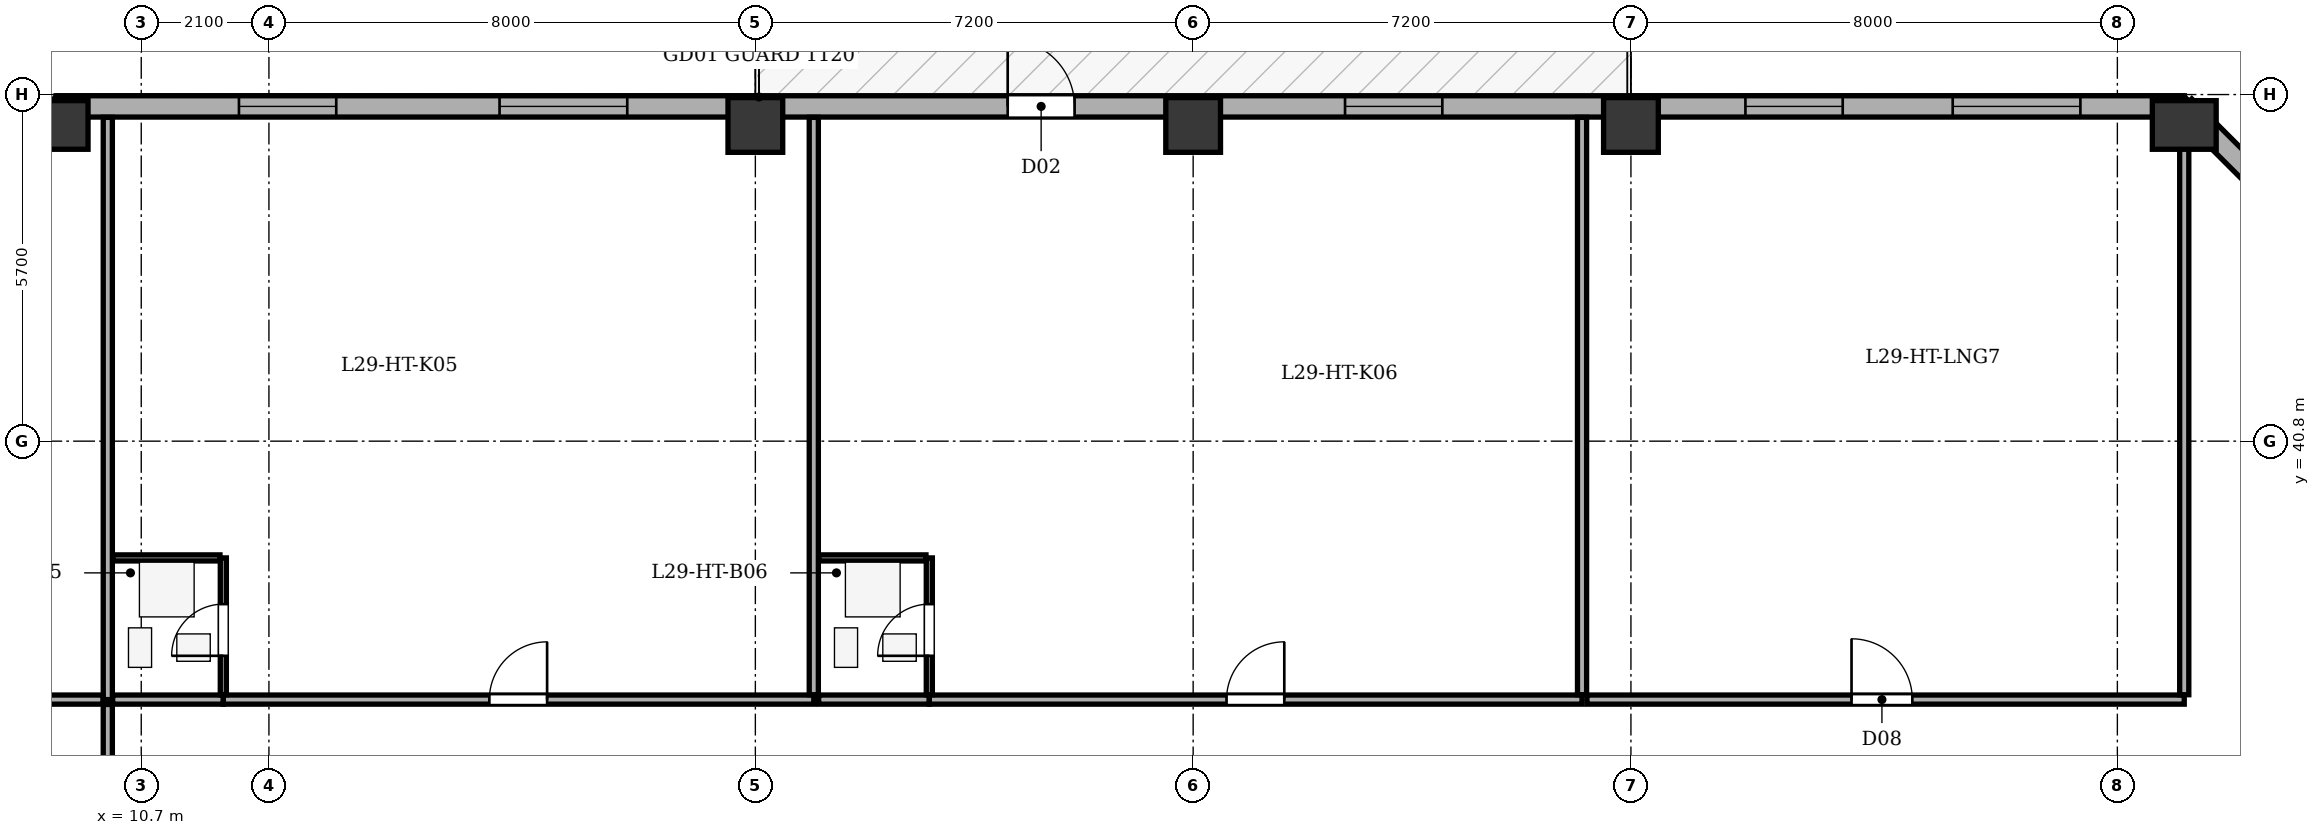
"""IFC4 building model, lengths in metres.
Left out: names, types, materials, properties, quantities, classifications, styles, units other than length and angle.
Written with IfcOpenShell. Run it as: python <this file> out.ifc"""

import sys

from ifc_helpers import new_model, si_unit, direction, frame, frame_2d, origin, origin_2d, place, context, subcontext, project, spatial, rectangle, extrude, element, fill, save


model = new_model("IFC4")
c1 = context("Model", 3, precision=1e-05, world=origin(), true_north=direction((0.0, 1.0)))
c2 = subcontext(c1, "Body", "Model", "MODEL_VIEW")
j1 = project(units=[si_unit("LENGTHUNIT", "METRE"), si_unit("PLANEANGLEUNIT", "RADIAN")], contexts=[c1])
p1 = place(None, origin())
s1 = spatial("IfcSite", under=j1, at=p1, CompositionType="ELEMENT")
p2 = place(p1, origin())
s2 = spatial("IfcBuilding", under=s1, at=p2, CompositionType="ELEMENT")
p3 = place(p2, frame((0.0, 0.0, 120.3)))
s3 = spatial("IfcBuildingStorey", under=s2, at=p3, CompositionType="ELEMENT", Elevation=120.3)
p4 = place(p3, frame((9.3, 46.0, 0.0), z_axis=(0.0, 0.0, 1.0), x_axis=(1.0, 0.0, 0.0)))
e1 = element("IfcColumn", 1, at=p4, inside=s3, PredefinedType="COLUMN", context=c2, shape_type="SweptSolid", body=[
    extrude(rectangle(XDim=0.8, YDim=1.05, at=origin_2d()), origin(), (0.0, 0.0, 1.0), 3.5),
])
for number, where, z_axis, x_axis in (
    (2, (20.8, 46.0, 0.0), (0.0, 0.0, 1.0), (1.0, 0.0, 0.0)),
    (3, (28.0, 46.0, 0.0), (0.0, 0.0, 1.0), (1.0, 0.0, 0.0)),
    (4, (35.2, 46.0, 0.0), (0.0, 0.0, 1.0), (1.0, 0.0, 0.0)),
):
    element("IfcColumn", number, at=place(p3, frame(where, z_axis=z_axis, x_axis=x_axis)), inside=s3, PredefinedType="COLUMN", context=c2, shape_type="SweptSolid", body=[
        extrude(rectangle(XDim=0.9, YDim=0.9, at=origin_2d()), origin(), (0.0, 0.0, 1.0), 3.5),
    ])
p5 = place(p3, frame((44.3, 46.0, 0.0), z_axis=(0.0, 0.0, 1.0), x_axis=(1.0, 0.0, 0.0)))
e5 = element("IfcColumn", 5, at=p5, inside=s3, PredefinedType="COLUMN", context=c2, shape_type="SweptSolid", body=[
    extrude(rectangle(XDim=0.8, YDim=1.05, at=origin_2d()), origin(), (0.0, 0.0, 1.0), 3.5),
])
p6 = place(p3, frame((4.495, 41.5, 0.0), z_axis=(0.0, 0.0, 1.0), x_axis=(0.707106781187, 0.707106781187, 0.0)))
e6 = element("IfcWall", 6, at=p6, inside=s3, PredefinedType="STANDARD", context=c2, shape_type="SweptSolid", body=[
    extrude(rectangle(XDim=6.795, YDim=0.35, at=frame_2d((3.397, 0.0))), origin(), (0.0, 0.0, 1.0), 2.785),
])
p7 = place(p6, frame((2.698, 0.0, 0.75)))
e7 = element("IfcOpeningElement", 7, at=p7, cuts=e6, PredefinedType="OPENING", context=c2, shape_type="SweptSolid", body=[
    extrude(rectangle(XDim=1.4, YDim=1.65, at=frame_2d((0.7, 0.825))), frame((0.0, 0.185, 0.0), z_axis=(0.0, -1.0, 0.0), x_axis=(1.0, 0.0, 0.0)), (0.0, 0.0, 1.0), 0.37),
])
p8 = place(p3, frame((9.3, 46.305, 0.0), z_axis=(0.0, 0.0, 1.0), x_axis=(1.0, 0.0, 0.0)))
e8 = element("IfcWall", 8, at=p8, inside=s3, PredefinedType="STANDARD", context=c2, shape_type="SweptSolid", body=[
    extrude(rectangle(XDim=35.0, YDim=0.35, at=frame_2d((17.5, 0.0))), origin(), (0.0, 0.0, 1.0), 2.785),
])
p9 = place(p8, frame((15.65, 0.0, 0.0)))
e9 = element("IfcOpeningElement", 9, at=p9, cuts=e8, PredefinedType="OPENING", context=c2, shape_type="SweptSolid", body=[
    extrude(rectangle(XDim=1.1, YDim=2.05, at=frame_2d((0.55, 1.025))), frame((0.0, 0.185, 0.0), z_axis=(0.0, -1.0, 0.0), x_axis=(1.0, 0.0, 0.0)), (0.0, 0.0, 1.0), 0.37),
])
p10 = place(p8, frame((3.007, 0.0, 0.75)))
e10 = element("IfcOpeningElement", 10, at=p10, cuts=e8, PredefinedType="OPENING", context=c2, shape_type="SweptSolid", body=[
    extrude(rectangle(XDim=1.6, YDim=1.75, at=frame_2d((0.8, 0.875))), frame((0.0, 0.185, 0.0), z_axis=(0.0, -1.0, 0.0), x_axis=(1.0, 0.0, 0.0)), (0.0, 0.0, 1.0), 0.37),
])
p11 = place(p8, frame((7.293, 0.0, 0.75)))
e11 = element("IfcOpeningElement", 11, at=p11, cuts=e8, PredefinedType="OPENING", context=c2, shape_type="SweptSolid", body=[
    extrude(rectangle(XDim=2.1, YDim=1.75, at=frame_2d((1.05, 0.875))), frame((0.0, 0.185, 0.0), z_axis=(0.0, -1.0, 0.0), x_axis=(1.0, 0.0, 0.0)), (0.0, 0.0, 1.0), 0.37),
])
p12 = place(p8, frame((21.198, 0.0, 0.75)))
e12 = element("IfcOpeningElement", 12, at=p12, cuts=e8, PredefinedType="OPENING", context=c2, shape_type="SweptSolid", body=[
    extrude(rectangle(XDim=1.6, YDim=1.75, at=frame_2d((0.8, 0.875))), frame((0.0, 0.185, 0.0), z_axis=(0.0, -1.0, 0.0), x_axis=(1.0, 0.0, 0.0)), (0.0, 0.0, 1.0), 0.37),
])
p13 = place(p8, frame((27.783, 0.0, 0.75)))
e13 = element("IfcOpeningElement", 13, at=p13, cuts=e8, PredefinedType="OPENING", context=c2, shape_type="SweptSolid", body=[
    extrude(rectangle(XDim=1.6, YDim=1.75, at=frame_2d((0.8, 0.875))), frame((0.0, 0.185, 0.0), z_axis=(0.0, -1.0, 0.0), x_axis=(1.0, 0.0, 0.0)), (0.0, 0.0, 1.0), 0.37),
])
p14 = place(p8, frame((31.192, 0.0, 0.75)))
e14 = element("IfcOpeningElement", 14, at=p14, cuts=e8, PredefinedType="OPENING", context=c2, shape_type="SweptSolid", body=[
    extrude(rectangle(XDim=2.1, YDim=1.75, at=frame_2d((1.05, 0.875))), frame((0.0, 0.185, 0.0), z_axis=(0.0, -1.0, 0.0), x_axis=(1.0, 0.0, 0.0)), (0.0, 0.0, 1.0), 0.37),
])
p15 = place(p3, frame((44.3, 46.305, 0.0), z_axis=(0.0, 0.0, 1.0), x_axis=(0.707106781187, -0.707106781187, 0.0)))
e15 = element("IfcWall", 15, at=p15, inside=s3, PredefinedType="STANDARD", context=c2, shape_type="SweptSolid", body=[
    extrude(rectangle(XDim=6.795, YDim=0.35, at=frame_2d((3.397, 0.0))), origin(), (0.0, 0.0, 1.0), 2.785),
])
p16 = place(p15, frame((2.698, 0.0, 0.75)))
e16 = element("IfcOpeningElement", 16, at=p16, cuts=e15, PredefinedType="OPENING", context=c2, shape_type="SweptSolid", body=[
    extrude(rectangle(XDim=1.4, YDim=1.65, at=frame_2d((0.7, 0.825))), frame((0.0, 0.185, 0.0), z_axis=(0.0, -1.0, 0.0), x_axis=(1.0, 0.0, 0.0)), (0.0, 0.0, 1.0), 0.37),
])
p17 = place(p3, frame((10.15, 36.55, 0.0), z_axis=(0.0, 0.0, 1.0), x_axis=(0.0, 1.0, 0.0)))
e17 = element("IfcWall", 17, at=p17, inside=s3, PredefinedType="PARTITIONING", context=c2, shape_type="SweptSolid", body=[
    extrude(rectangle(XDim=9.575, YDim=0.15, at=frame_2d((4.788, 0.0))), origin(), (0.0, 0.0, 1.0), 3.2),
])
p18 = place(p3, frame((10.23, 36.55, 0.0), z_axis=(0.0, 0.0, 1.0), x_axis=(1.0, 0.0, 0.0)))
e18 = element("IfcWall", 18, at=p18, inside=s3, PredefinedType="PARTITIONING", context=c2, shape_type="SweptSolid", body=[
    extrude(rectangle(XDim=1.82, YDim=0.15, at=frame_2d((0.91, 0.0))), origin(), (0.0, 0.0, 1.0), 3.2),
])
p19 = place(p3, frame((12.05, 36.55, 0.0), z_axis=(0.0, 0.0, 1.0), x_axis=(1.0, 0.0, 0.0)))
e19 = element("IfcWall", 19, at=p19, inside=s3, PredefinedType="PARTITIONING", context=c2, shape_type="SweptSolid", body=[
    extrude(rectangle(XDim=9.711, YDim=0.15, at=frame_2d((4.855, 0.0))), origin(), (0.0, 0.0, 1.0), 3.2),
])
p20 = place(p19, frame((4.375, 0.0, 0.0)))
e20 = element("IfcOpeningElement", 20, at=p20, cuts=e19, PredefinedType="OPENING", context=c2, shape_type="SweptSolid", body=[
    extrude(rectangle(XDim=0.95, YDim=2.1, at=frame_2d((0.475, 1.05))), frame((0.0, 0.085, 0.0), z_axis=(0.0, -1.0, 0.0), x_axis=(1.0, 0.0, 0.0)), (0.0, 0.0, 1.0), 0.17),
])
p21 = place(p3, frame((12.05, 36.63, 0.0), z_axis=(0.0, 0.0, 1.0), x_axis=(0.0, 1.0, 0.0)))
e21 = element("IfcWall", 21, at=p21, inside=s3, PredefinedType="PARTITIONING", context=c2, shape_type="SweptSolid", body=[
    extrude(rectangle(XDim=2.25, YDim=0.1, at=frame_2d((1.125, 0.0))), origin(), (0.0, 0.0, 1.0), 3.2),
])
p22 = place(p21, frame((0.64, 0.0, 0.0)))
e22 = element("IfcOpeningElement", 22, at=p22, cuts=e21, PredefinedType="OPENING", context=c2, shape_type="SweptSolid", body=[
    extrude(rectangle(XDim=0.85, YDim=2.05, at=frame_2d((0.425, 1.025))), frame((0.0, 0.06, 0.0), z_axis=(0.0, -1.0, 0.0), x_axis=(1.0, 0.0, 0.0)), (0.0, 0.0, 1.0), 0.12),
])
p23 = place(p3, frame((10.23, 38.88, 0.0), z_axis=(0.0, 0.0, 1.0), x_axis=(1.0, 0.0, 0.0)))
e23 = element("IfcWall", 23, at=p23, inside=s3, PredefinedType="PARTITIONING", context=c2, shape_type="SweptSolid", body=[
    extrude(rectangle(XDim=1.765, YDim=0.1, at=frame_2d((0.883, 0.0))), origin(), (0.0, 0.0, 1.0), 3.2),
])
p24 = place(p3, frame((21.761, 36.63, 0.0), z_axis=(0.0, 0.0, 1.0), x_axis=(0.0, 1.0, 0.0)))
e24 = element("IfcWall", 24, at=p24, inside=s3, PredefinedType="PARTITIONING", context=c2, shape_type="SweptSolid", body=[
    extrude(rectangle(XDim=9.495, YDim=0.15, at=frame_2d((4.748, 0.0))), origin(), (0.0, 0.0, 1.0), 3.2),
])
p25 = place(p3, frame((21.841, 36.55, 0.0), z_axis=(0.0, 0.0, 1.0), x_axis=(1.0, 0.0, 0.0)))
e25 = element("IfcWall", 25, at=p25, inside=s3, PredefinedType="PARTITIONING", context=c2, shape_type="SweptSolid", body=[
    extrude(rectangle(XDim=1.82, YDim=0.15, at=frame_2d((0.91, 0.0))), origin(), (0.0, 0.0, 1.0), 3.2),
])
p26 = place(p3, frame((23.661, 36.55, 0.0), z_axis=(0.0, 0.0, 1.0), x_axis=(1.0, 0.0, 0.0)))
e26 = element("IfcWall", 26, at=p26, inside=s3, PredefinedType="PARTITIONING", context=c2, shape_type="SweptSolid", body=[
    extrude(rectangle(XDim=10.735, YDim=0.15, at=frame_2d((5.368, 0.0))), origin(), (0.0, 0.0, 1.0), 3.2),
])
p27 = place(p26, frame((4.888, 0.0, 0.0)))
e27 = element("IfcOpeningElement", 27, at=p27, cuts=e26, PredefinedType="OPENING", context=c2, shape_type="SweptSolid", body=[
    extrude(rectangle(XDim=0.95, YDim=2.1, at=frame_2d((0.475, 1.05))), frame((0.0, 0.085, 0.0), z_axis=(0.0, -1.0, 0.0), x_axis=(1.0, 0.0, 0.0)), (0.0, 0.0, 1.0), 0.17),
])
p28 = place(p3, frame((23.661, 36.63, 0.0), z_axis=(0.0, 0.0, 1.0), x_axis=(0.0, 1.0, 0.0)))
e28 = element("IfcWall", 28, at=p28, inside=s3, PredefinedType="PARTITIONING", context=c2, shape_type="SweptSolid", body=[
    extrude(rectangle(XDim=2.25, YDim=0.1, at=frame_2d((1.125, 0.0))), origin(), (0.0, 0.0, 1.0), 3.2),
])
p29 = place(p28, frame((0.64, 0.0, 0.0)))
e29 = element("IfcOpeningElement", 29, at=p29, cuts=e28, PredefinedType="OPENING", context=c2, shape_type="SweptSolid", body=[
    extrude(rectangle(XDim=0.85, YDim=2.05, at=frame_2d((0.425, 1.025))), frame((0.0, 0.06, 0.0), z_axis=(0.0, -1.0, 0.0), x_axis=(1.0, 0.0, 0.0)), (0.0, 0.0, 1.0), 0.12),
])
p30 = place(p3, frame((21.841, 38.88, 0.0), z_axis=(0.0, 0.0, 1.0), x_axis=(1.0, 0.0, 0.0)))
e30 = element("IfcWall", 30, at=p30, inside=s3, PredefinedType="PARTITIONING", context=c2, shape_type="SweptSolid", body=[
    extrude(rectangle(XDim=1.765, YDim=0.1, at=frame_2d((0.882, 0.0))), origin(), (0.0, 0.0, 1.0), 3.2),
])
p31 = place(p3, frame((34.396, 36.63, 0.0), z_axis=(0.0, 0.0, 1.0), x_axis=(0.0, 1.0, 0.0)))
e31 = element("IfcWall", 31, at=p31, inside=s3, PredefinedType="PARTITIONING", context=c2, shape_type="SweptSolid", body=[
    extrude(rectangle(XDim=9.495, YDim=0.15, at=frame_2d((4.748, 0.0))), origin(), (0.0, 0.0, 1.0), 3.2),
])
p32 = place(p3, frame((34.476, 36.55, 0.0), z_axis=(0.0, 0.0, 1.0), x_axis=(1.0, 0.0, 0.0)))
e32 = element("IfcWall", 32, at=p32, inside=s3, PredefinedType="PARTITIONING", context=c2, shape_type="SweptSolid", body=[
    extrude(rectangle(XDim=9.824, YDim=0.15, at=frame_2d((4.912, 0.0))), origin(), (0.0, 0.0, 1.0), 3.2),
])
p33 = place(p32, frame((4.352, 0.0, 0.0)))
e33 = element("IfcOpeningElement", 33, at=p33, cuts=e32, PredefinedType="OPENING", context=c2, shape_type="SweptSolid", body=[
    extrude(rectangle(XDim=1.0, YDim=2.1, at=frame_2d((0.5, 1.05))), frame((0.0, 0.085, 0.0), z_axis=(0.0, -1.0, 0.0), x_axis=(1.0, 0.0, 0.0)), (0.0, 0.0, 1.0), 0.17),
])
p34 = place(p3, frame((44.3, 36.63, 0.0), z_axis=(0.0, 0.0, 1.0), x_axis=(0.0, 1.0, 0.0)))
e34 = element("IfcWall", 34, at=p34, inside=s3, PredefinedType="PARTITIONING", context=c2, shape_type="SweptSolid", body=[
    extrude(rectangle(XDim=9.495, YDim=0.15, at=frame_2d((4.748, 0.0))), origin(), (0.0, 0.0, 1.0), 3.2),
])
p35 = place(p3, frame((4.675, 36.55, 0.0), z_axis=(0.0, 0.0, 1.0), x_axis=(1.0, 0.0, 0.0)))
e35 = element("IfcWall", 35, at=p35, inside=s3, PredefinedType="PARTITIONING", context=c2, shape_type="SweptSolid", body=[
    extrude(rectangle(XDim=5.395, YDim=0.15, at=frame_2d((2.698, 0.0))), origin(), (0.0, 0.0, 1.0), 3.2),
])
p36 = place(p3, frame((10.15, 17.93, 0.0), z_axis=(0.0, 0.0, 1.0), x_axis=(0.0, 1.0, 0.0)))
e36 = element("IfcWall", 36, at=p36, inside=s3, PredefinedType="PARTITIONING", context=c2, shape_type="SweptSolid", body=[
    extrude(rectangle(XDim=18.54, YDim=0.15, at=frame_2d((9.27, 0.0))), origin(), (0.0, 0.0, 1.0), 3.2),
])
p37 = place(p36, frame((8.79, 0.0, 0.0)))
e37 = element("IfcOpeningElement", 37, at=p37, cuts=e36, PredefinedType="OPENING", context=c2, shape_type="SweptSolid", body=[
    extrude(rectangle(XDim=0.95, YDim=2.1, at=frame_2d((0.475, 1.05))), frame((0.0, 0.085, 0.0), z_axis=(0.0, -1.0, 0.0), x_axis=(1.0, 0.0, 0.0)), (0.0, 0.0, 1.0), 0.17),
])
p38 = place(p9, origin())
e38 = element("IfcDoor", 38, at=p38, inside=s3, OperationType="SINGLE_SWING_LEFT", PredefinedType="DOOR", context=c2, shape_type="SweptSolid", body=[
    extrude(rectangle(XDim=1.1, YDim=2.05, at=frame_2d((0.55, 1.025))), frame((0.0, 0.025, 0.0), z_axis=(0.0, -1.0, 0.0), x_axis=(1.0, 0.0, 0.0)), (0.0, 0.0, 1.0), 0.05),
])
fill(e9, e38)
p39 = place(p10, origin())
e39 = element("IfcWindow", 39, at=p39, inside=s3, PartitioningType="SINGLE_PANEL", PredefinedType="WINDOW", context=c2, shape_type="SweptSolid", body=[
    extrude(rectangle(XDim=1.6, YDim=1.75, at=frame_2d((0.8, 0.875))), frame((0.0, -0.01, 0.0), z_axis=(0.0, -1.0, 0.0), x_axis=(1.0, 0.0, 0.0)), (0.0, 0.0, 1.0), 0.06),
])
fill(e10, e39)
p40 = place(p11, origin())
e40 = element("IfcWindow", 40, at=p40, inside=s3, PartitioningType="SINGLE_PANEL", PredefinedType="WINDOW", context=c2, shape_type="SweptSolid", body=[
    extrude(rectangle(XDim=2.1, YDim=1.75, at=frame_2d((1.05, 0.875))), frame((0.0, -0.01, 0.0), z_axis=(0.0, -1.0, 0.0), x_axis=(1.0, 0.0, 0.0)), (0.0, 0.0, 1.0), 0.06),
])
fill(e11, e40)
p41 = place(p12, origin())
e41 = element("IfcWindow", 41, at=p41, inside=s3, PartitioningType="SINGLE_PANEL", PredefinedType="WINDOW", context=c2, shape_type="SweptSolid", body=[
    extrude(rectangle(XDim=1.6, YDim=1.75, at=frame_2d((0.8, 0.875))), frame((0.0, -0.01, 0.0), z_axis=(0.0, -1.0, 0.0), x_axis=(1.0, 0.0, 0.0)), (0.0, 0.0, 1.0), 0.06),
])
fill(e12, e41)
p42 = place(p13, origin())
e42 = element("IfcWindow", 42, at=p42, inside=s3, PartitioningType="SINGLE_PANEL", PredefinedType="WINDOW", context=c2, shape_type="SweptSolid", body=[
    extrude(rectangle(XDim=1.6, YDim=1.75, at=frame_2d((0.8, 0.875))), frame((0.0, -0.01, 0.0), z_axis=(0.0, -1.0, 0.0), x_axis=(1.0, 0.0, 0.0)), (0.0, 0.0, 1.0), 0.06),
])
fill(e13, e42)
p43 = place(p14, origin())
e43 = element("IfcWindow", 43, at=p43, inside=s3, PartitioningType="SINGLE_PANEL", PredefinedType="WINDOW", context=c2, shape_type="SweptSolid", body=[
    extrude(rectangle(XDim=2.1, YDim=1.75, at=frame_2d((1.05, 0.875))), frame((0.0, -0.01, 0.0), z_axis=(0.0, -1.0, 0.0), x_axis=(1.0, 0.0, 0.0)), (0.0, 0.0, 1.0), 0.06),
])
fill(e14, e43)
p44 = place(p22, origin())
e44 = element("IfcDoor", 44, at=p44, inside=s3, OperationType="SINGLE_SWING_LEFT", PredefinedType="DOOR", context=c2, shape_type="SweptSolid", body=[
    extrude(rectangle(XDim=0.85, YDim=2.05, at=frame_2d((0.425, 1.025))), frame((0.0, 0.025, 0.0), z_axis=(0.0, -1.0, 0.0), x_axis=(1.0, 0.0, 0.0)), (0.0, 0.0, 1.0), 0.05),
])
fill(e22, e44)
p45 = place(p20, origin())
e45 = element("IfcDoor", 45, at=p45, inside=s3, OperationType="SINGLE_SWING_RIGHT", PredefinedType="DOOR", context=c2, shape_type="SweptSolid", body=[
    extrude(rectangle(XDim=0.95, YDim=2.1, at=frame_2d((0.475, 1.05))), frame((0.0, 0.025, 0.0), z_axis=(0.0, -1.0, 0.0), x_axis=(1.0, 0.0, 0.0)), (0.0, 0.0, 1.0), 0.05),
])
fill(e20, e45)
p46 = place(p29, origin())
e46 = element("IfcDoor", 46, at=p46, inside=s3, OperationType="SINGLE_SWING_LEFT", PredefinedType="DOOR", context=c2, shape_type="SweptSolid", body=[
    extrude(rectangle(XDim=0.85, YDim=2.05, at=frame_2d((0.425, 1.025))), frame((0.0, 0.025, 0.0), z_axis=(0.0, -1.0, 0.0), x_axis=(1.0, 0.0, 0.0)), (0.0, 0.0, 1.0), 0.05),
])
fill(e29, e46)
p47 = place(p27, origin())
e47 = element("IfcDoor", 47, at=p47, inside=s3, OperationType="SINGLE_SWING_RIGHT", PredefinedType="DOOR", context=c2, shape_type="SweptSolid", body=[
    extrude(rectangle(XDim=0.95, YDim=2.1, at=frame_2d((0.475, 1.05))), frame((0.0, 0.025, 0.0), z_axis=(0.0, -1.0, 0.0), x_axis=(1.0, 0.0, 0.0)), (0.0, 0.0, 1.0), 0.05),
])
fill(e27, e47)
p48 = place(p33, origin())
e48 = element("IfcDoor", 48, at=p48, inside=s3, OperationType="SINGLE_SWING_LEFT", PredefinedType="DOOR", context=c2, shape_type="SweptSolid", body=[
    extrude(rectangle(XDim=1.0, YDim=2.1, at=frame_2d((0.5, 1.05))), frame((0.0, 0.025, 0.0), z_axis=(0.0, -1.0, 0.0), x_axis=(1.0, 0.0, 0.0)), (0.0, 0.0, 1.0), 0.05),
])
fill(e33, e48)
save(model, sys.argv[1])
